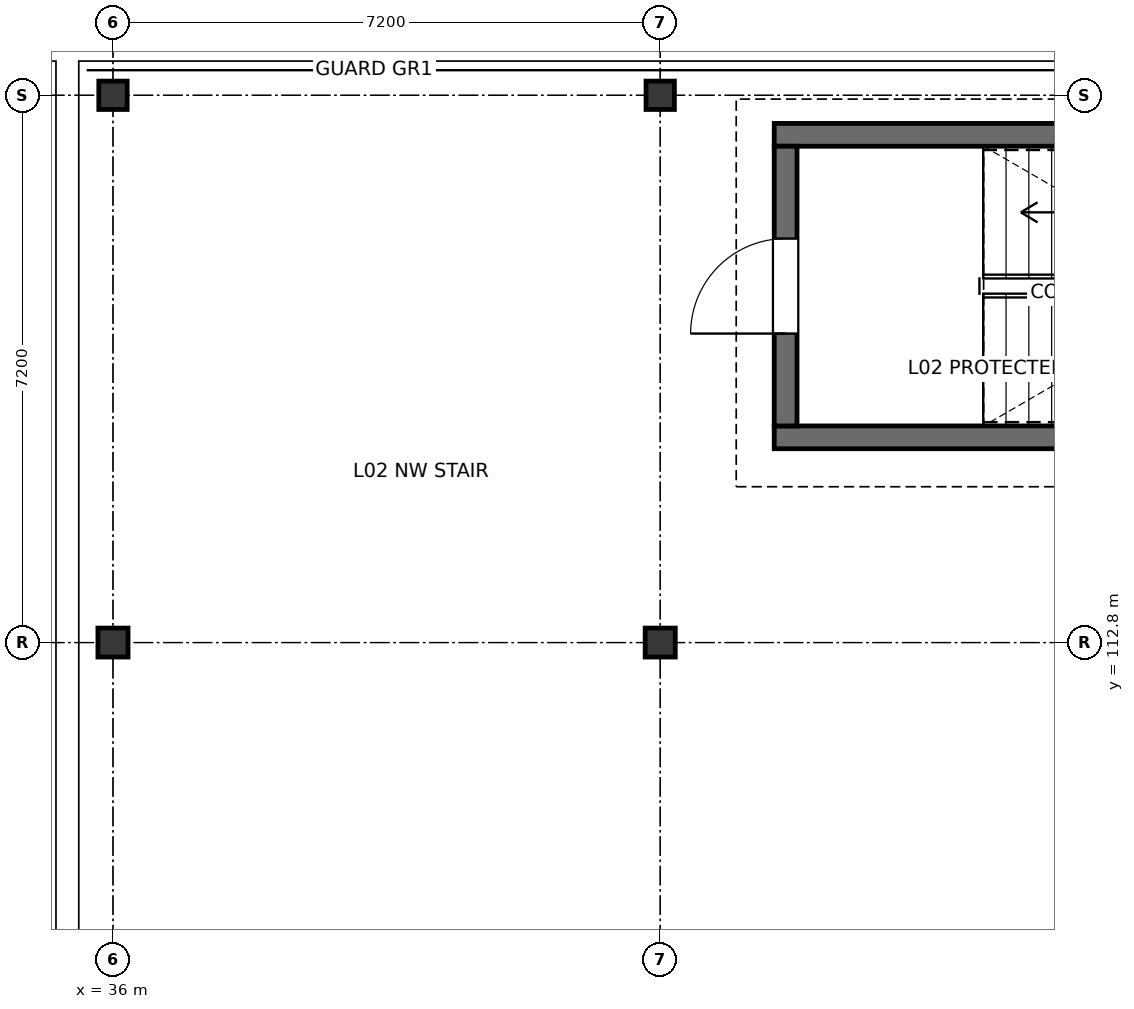
"""IFC4 building model, lengths in metres.
Left out: names, types, materials, properties, quantities, classifications, styles, units other than length and angle.
Written with IfcOpenShell. Run it as: python <this file> out.ifc"""

import sys

from ifc_helpers import new_model, si_unit, direction, frame, frame_2d, origin, origin_2d, place, context, subcontext, project, spatial, rectangle, i_section, extrude, element, fill, save


model = new_model("IFC4")
c1 = context("Model", 3, precision=1e-05, world=origin(), true_north=direction((0.0, 1.0)))
c2 = subcontext(c1, "Body", "Model", "MODEL_VIEW")
j1 = project(units=[si_unit("LENGTHUNIT", "METRE"), si_unit("PLANEANGLEUNIT", "RADIAN")], contexts=[c1])
p1 = place(None, origin())
s1 = spatial("IfcSite", under=j1, at=p1, CompositionType="ELEMENT")
p2 = place(p1, origin())
s2 = spatial("IfcBuilding", under=s1, at=p2, CompositionType="ELEMENT")
p3 = place(p2, frame((0.0, 0.0, 9.3)))
s3 = spatial("IfcBuildingStorey", under=s2, at=p3, CompositionType="ELEMENT", Elevation=9.3)
p4 = place(p3, frame((36.0, 112.8, 0.0), z_axis=(0.0, 0.0, 1.0), x_axis=(1.0, 0.0, 0.0)))
e1 = element("IfcColumn", 1, at=p4, inside=s3, PredefinedType="COLUMN", context=c2, shape_type="SweptSolid", body=[
    extrude(i_section(OverallWidth=0.396, OverallDepth=0.381, WebThickness=0.019, FlangeThickness=0.03, FilletRadius=0.015, at=origin_2d()), origin(), (0.0, 0.0, 1.0), 3.9),
])
p5 = place(p3, frame((36.0, 120.0, 0.0), z_axis=(0.0, 0.0, 1.0), x_axis=(1.0, 0.0, 0.0)))
e2 = element("IfcColumn", 2, at=p5, inside=s3, PredefinedType="COLUMN", context=c2, shape_type="SweptSolid", body=[
    extrude(i_section(OverallWidth=0.373, OverallDepth=0.373, WebThickness=0.016, FlangeThickness=0.026, FilletRadius=0.015, at=origin_2d()), origin(), (0.0, 0.0, 1.0), 3.9),
])
p6 = place(p3, frame((43.2, 112.8, 0.0), z_axis=(0.0, 0.0, 1.0), x_axis=(1.0, 0.0, 0.0)))
e3 = element("IfcColumn", 3, at=p6, inside=s3, PredefinedType="COLUMN", context=c2, shape_type="SweptSolid", body=[
    extrude(i_section(OverallWidth=0.396, OverallDepth=0.381, WebThickness=0.019, FlangeThickness=0.03, FilletRadius=0.015, at=origin_2d()), origin(), (0.0, 0.0, 1.0), 3.9),
])
p7 = place(p3, frame((43.2, 120.0, 0.0), z_axis=(0.0, 0.0, 1.0), x_axis=(1.0, 0.0, 0.0)))
e4 = element("IfcColumn", 4, at=p7, inside=s3, PredefinedType="COLUMN", context=c2, shape_type="SweptSolid", body=[
    extrude(i_section(OverallWidth=0.373, OverallDepth=0.373, WebThickness=0.016, FlangeThickness=0.026, FilletRadius=0.015, at=origin_2d()), origin(), (0.0, 0.0, 1.0), 3.9),
])
for number, where, z_axis, x_axis in (
    (5, (54.1, 115.5, 0.0), (0.0, 0.0, 1.0), (-1.0, 0.0, 0.0)),
    (6, (44.7, 119.48, 0.0), (0.0, 0.0, 1.0), (1.0, 0.0, 0.0)),
):
    element("IfcWall", number, at=place(p3, frame(where, z_axis=z_axis, x_axis=x_axis)), inside=s3, PredefinedType="SOLIDWALL", context=c2, shape_type="SweptSolid", body=[
        extrude(rectangle(XDim=9.4, YDim=0.3, at=frame_2d((4.7, 0.0))), origin(), (0.0, 0.0, 1.0), 3.69),
    ])
p8 = place(p3, frame((44.85, 115.65, 0.0), z_axis=(0.0, 0.0, 1.0), x_axis=(0.0, 1.0, 0.0)))
e7 = element("IfcWall", 7, at=p8, inside=s3, PredefinedType="SOLIDWALL", context=c2, shape_type="SweptSolid", body=[
    extrude(rectangle(XDim=3.68, YDim=0.3, at=frame_2d((1.84, 0.0))), origin(), (0.0, 0.0, 1.0), 3.69),
])
p9 = place(p8, frame((1.215, 0.0, 0.0)))
e8 = element("IfcOpeningElement", 8, at=p9, cuts=e7, PredefinedType="OPENING", context=c2, shape_type="SweptSolid", body=[
    extrude(rectangle(XDim=1.25, YDim=2.2, at=frame_2d((0.625, 1.1))), frame((0.0, 0.16, 0.0), z_axis=(0.0, -1.0, 0.0), x_axis=(1.0, 0.0, 0.0)), (0.0, 0.0, 1.0), 0.32),
])
p10 = place(p9, origin())
e9 = element("IfcDoor", 9, at=p10, inside=s3, OperationType="SINGLE_SWING_LEFT", PredefinedType="DOOR", context=c2, shape_type="SweptSolid", body=[
    extrude(rectangle(XDim=1.25, YDim=2.2, at=frame_2d((0.625, 1.1))), frame((0.0, 0.025, 0.0), z_axis=(0.0, -1.0, 0.0), x_axis=(1.0, 0.0, 0.0)), (0.0, 0.0, 1.0), 0.05),
])
fill(e8, e9)
save(model, sys.argv[1])
